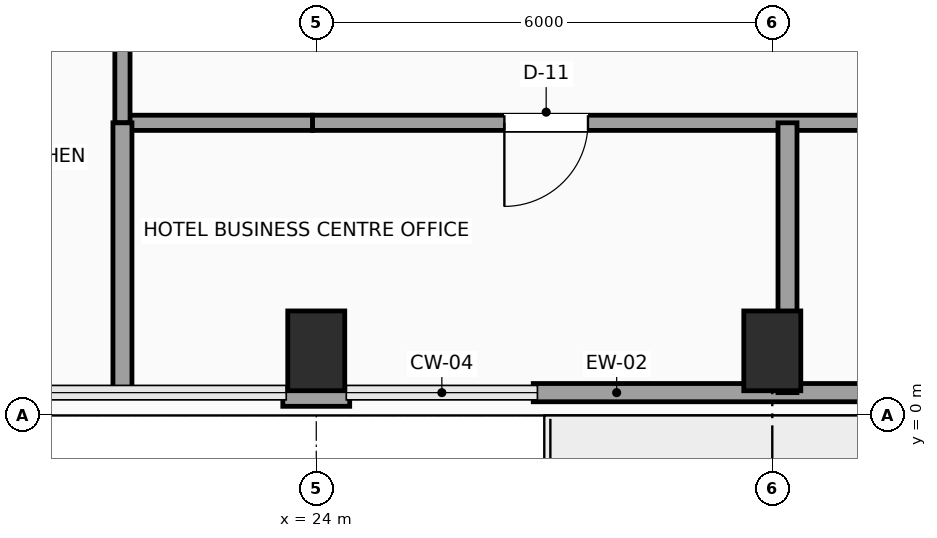
"""IFC4 building model, lengths in metres.
Left out: names, types, materials, properties, quantities, classifications, styles, units other than length and angle.
Written with IfcOpenShell. Run it as: python <this file> out.ifc"""

import sys

from ifc_helpers import new_model, si_unit, direction, frame, frame_2d, origin, origin_2d, place, context, subcontext, project, spatial, rectangle, extrude, element, fill, save


model = new_model("IFC4")
c1 = context("Model", 3, precision=1e-05, world=origin(), true_north=direction((0.0, 1.0)))
c2 = subcontext(c1, "Body", "Model", "MODEL_VIEW")
j1 = project(units=[si_unit("LENGTHUNIT", "METRE"), si_unit("PLANEANGLEUNIT", "RADIAN")], contexts=[c1])
p1 = place(None, origin())
s1 = spatial("IfcSite", under=j1, at=p1, CompositionType="ELEMENT")
p2 = place(p1, origin())
s2 = spatial("IfcBuilding", under=s1, at=p2, CompositionType="ELEMENT")
p3 = place(p2, frame((0.0, 0.0, 180.45)))
s3 = spatial("IfcBuildingStorey", under=s2, at=p3, CompositionType="ELEMENT", Elevation=180.45)
for number, where, z_axis, x_axis in (
    (1, (24.0, 0.85, 0.0), (0.0, 0.0, 1.0), (1.0, 0.0, 0.0)),
    (2, (30.0, 0.85, 0.0), (0.0, 0.0, 1.0), (1.0, 0.0, 0.0)),
):
    element("IfcColumn", number, at=place(p3, frame(where, z_axis=z_axis, x_axis=x_axis)), inside=s3, PredefinedType="COLUMN", context=c2, shape_type="SweptSolid", body=[
        extrude(rectangle(XDim=0.75, YDim=1.05, at=origin_2d()), origin(), (0.0, 0.0, 1.0), 3.75),
    ])
p4 = place(p3, frame((36.145, 0.3, 0.0), z_axis=(0.0, 0.0, 1.0), x_axis=(-1.0, 0.0, 0.0)))
e3 = element("IfcWall", 3, at=p4, inside=s3, PredefinedType="SOLIDWALL", context=c2, shape_type="SweptSolid", body=[
    extrude(rectangle(XDim=9.29, YDim=0.24, at=frame_2d((4.645, 0.0))), origin(), (0.0, 0.0, 1.0), 3.54),
])
p5 = place(p4, frame((3.945, 0.0, 0.0)))
e4 = element("IfcOpeningElement", 4, at=p5, cuts=e3, PredefinedType="OPENING", context=c2, shape_type="SweptSolid", body=[
    extrude(rectangle(XDim=1.05, YDim=2.2, at=frame_2d((0.525, 1.1))), frame((0.0, 0.13, 0.0), z_axis=(0.0, -1.0, 0.0), x_axis=(1.0, 0.0, 0.0)), (0.0, 0.0, 1.0), 0.26),
])
p6 = place(p3, frame((24.44, 0.24, 0.0), z_axis=(0.0, 0.0, 1.0), x_axis=(-1.0, 0.0, 0.0)))
e5 = element("IfcWall", 5, at=p6, inside=s3, PredefinedType="SOLIDWALL", context=c2, shape_type="SweptSolid", body=[
    extrude(rectangle(XDim=0.88, YDim=0.24, at=frame_2d((0.44, 0.0))), origin(), (0.0, 0.0, 1.0), 3.54),
])
p7 = place(p3, frame((36.35, 3.85, 0.0), z_axis=(0.0, 0.0, 1.0), x_axis=(-1.0, 0.0, 0.0)))
e6 = element("IfcWall", 6, at=p7, inside=s3, PredefinedType="SOLIDWALL", context=c2, shape_type="SweptSolid", body=[
    extrude(rectangle(XDim=12.4, YDim=0.2, at=frame_2d((6.2, 0.0))), origin(), (0.0, 0.0, 1.0), 3.54),
])
p8 = place(p7, frame((8.775, 0.0, 0.0)))
e7 = element("IfcOpeningElement", 7, at=p8, cuts=e6, PredefinedType="OPENING", context=c2, shape_type="SweptSolid", body=[
    extrude(rectangle(XDim=1.1, YDim=2.25, at=frame_2d((0.55, 1.125))), frame((0.0, 0.11, 0.0), z_axis=(0.0, -1.0, 0.0), x_axis=(1.0, 0.0, 0.0)), (0.0, 0.0, 1.0), 0.22),
])
p9 = place(p3, frame((23.95, 3.85, 0.0), z_axis=(0.0, 0.0, 1.0), x_axis=(-1.0, 0.0, 0.0)))
e8 = element("IfcWall", 8, at=p9, inside=s3, PredefinedType="SOLIDWALL", context=c2, shape_type="SweptSolid", body=[
    extrude(rectangle(XDim=2.5, YDim=0.2, at=frame_2d((1.25, 0.0))), origin(), (0.0, 0.0, 1.0), 3.54),
])
p10 = place(p3, frame((21.45, 3.85, 0.0), z_axis=(0.0, 0.0, 1.0), x_axis=(0.0, 1.0, 0.0)))
e9 = element("IfcWall", 9, at=p10, inside=s3, PredefinedType="SOLIDWALL", context=c2, shape_type="SweptSolid", body=[
    extrude(rectangle(XDim=1.95, YDim=0.2, at=frame_2d((0.975, 0.0))), origin(), (0.0, 0.0, 1.0), 3.54),
])
p11 = place(p3, frame((21.45, 0.3, 0.0), z_axis=(0.0, 0.0, 1.0), x_axis=(0.0, 1.0, 0.0)))
e10 = element("IfcWall", 10, at=p11, inside=s3, PredefinedType="PARTITIONING", context=c2, shape_type="SweptSolid", body=[
    extrude(rectangle(XDim=3.55, YDim=0.25, at=frame_2d((1.775, 0.0))), origin(), (0.0, 0.0, 1.0), 3.54),
])
p12 = place(p3, frame((30.2, 0.3, 0.0), z_axis=(0.0, 0.0, 1.0), x_axis=(0.0, 1.0, 0.0)))
e11 = element("IfcWall", 11, at=p12, inside=s3, PredefinedType="PARTITIONING", context=c2, shape_type="SweptSolid", body=[
    extrude(rectangle(XDim=3.55, YDim=0.25, at=frame_2d((1.775, 0.0))), origin(), (0.0, 0.0, 1.0), 3.217),
])
p13 = place(p8, origin())
e12 = element("IfcDoor", 12, at=p13, inside=s3, OperationType="SINGLE_SWING_RIGHT", PredefinedType="DOOR", context=c2, shape_type="SweptSolid", body=[
    extrude(rectangle(XDim=1.1, YDim=2.25, at=frame_2d((0.55, 1.125))), frame((0.0, 0.025, 0.0), z_axis=(0.0, -1.0, 0.0), x_axis=(1.0, 0.0, 0.0)), (0.0, 0.0, 1.0), 0.05),
])
fill(e7, e12)
save(model, sys.argv[1])
